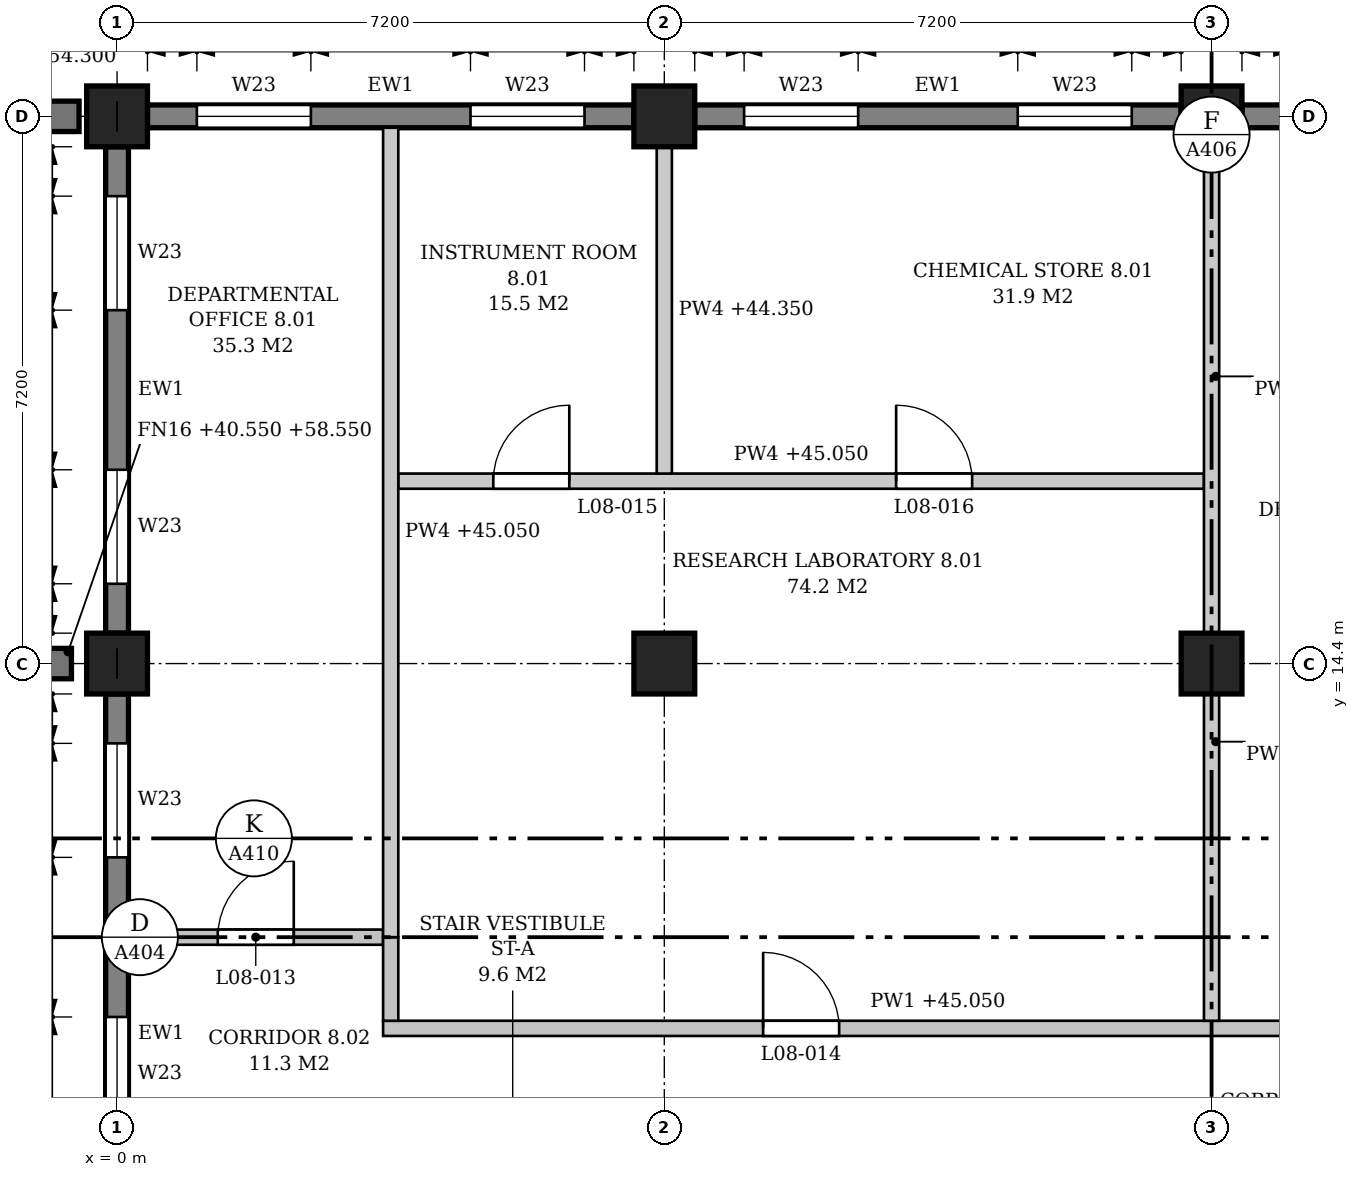
"""IFC4 building model, lengths in metres.
Left out: names, types, materials, properties, quantities, classifications, styles, units other than length and angle.
Written with IfcOpenShell. Run it as: python <this file> out.ifc"""

import sys

from ifc_helpers import new_model, si_unit, direction, frame, frame_2d, origin, origin_2d, place, context, subcontext, project, spatial, polyline, rectangle, outline, extrude, element, fill, save


model = new_model("IFC4")
c1 = context("Model", 3, precision=1e-05, world=origin(), true_north=direction((0.0, 1.0)))
c2 = subcontext(c1, "Body", "Model", "MODEL_VIEW")
j1 = project(units=[si_unit("LENGTHUNIT", "METRE"), si_unit("PLANEANGLEUNIT", "RADIAN")], contexts=[c1])
p1 = place(None, origin())
s1 = spatial("IfcSite", under=j1, at=p1, CompositionType="ELEMENT")
p2 = place(p1, origin())
s2 = spatial("IfcBuilding", under=s1, at=p2, CompositionType="ELEMENT")
p3 = place(p2, frame((0.0, 0.0, 40.8)))
s3 = spatial("IfcBuildingStorey", under=s2, at=p3, CompositionType="ELEMENT", Elevation=40.8)
for number, where, z_axis, x_axis in (
    (1, (0.0, 14.4, 0.0), (0.0, 0.0, 1.0), (1.0, 0.0, 0.0)),
    (2, (0.0, 21.6, 0.0), (0.0, 0.0, 1.0), (1.0, 0.0, 0.0)),
    (3, (7.2, 14.4, 0.0), (0.0, 0.0, 1.0), (1.0, 0.0, 0.0)),
    (4, (7.2, 21.6, 0.0), (0.0, 0.0, 1.0), (1.0, 0.0, 0.0)),
    (5, (14.4, 14.4, 0.0), (0.0, 0.0, 1.0), (1.0, 0.0, 0.0)),
    (6, (14.4, 21.6, 0.0), (0.0, 0.0, 1.0), (1.0, 0.0, 0.0)),
):
    element("IfcColumn", number, at=place(p3, frame(where, z_axis=z_axis, x_axis=x_axis)), inside=s3, PredefinedType="COLUMN", context=c2, shape_type="SweptSolid", body=[
        extrude(rectangle(XDim=0.8, YDim=0.8, at=origin_2d()), origin(), (0.0, 0.0, 1.0), 4.5),
    ])
p4 = place(p3, frame((0.0, 7.6, 0.0), z_axis=(0.0, 0.0, 1.0), x_axis=(0.0, 1.0, 0.0)))
e7 = element("IfcWall", 7, at=p4, inside=s3, PredefinedType="STANDARD", context=c2, shape_type="SweptSolid", body=[
    extrude(rectangle(XDim=6.4, YDim=0.3, at=frame_2d((3.2, 0.0))), origin(), (0.0, 0.0, 1.0), 3.65),
])
p5 = place(p4, frame((0.65, 0.0, 0.9)))
e8 = element("IfcOpeningElement", 8, at=p5, cuts=e7, PredefinedType="OPENING", context=c2, shape_type="SweptSolid", body=[
    extrude(outline(polyline([(0.0, 0.0), (1.5, 0.0), (1.5, 1.95), (0.75, 2.7), (0.0, 1.95), (0.0, 0.0)])), frame((0.0, 0.16, 0.0), z_axis=(0.0, -1.0, 0.0), x_axis=(1.0, 0.0, 0.0)), (0.0, 0.0, 1.0), 0.32),
])
p6 = place(p4, frame((4.25, 0.0, 0.9)))
e9 = element("IfcOpeningElement", 9, at=p6, cuts=e7, PredefinedType="OPENING", context=c2, shape_type="SweptSolid", body=[
    extrude(outline(polyline([(0.0, 0.0), (1.5, 0.0), (1.5, 1.95), (0.75, 2.7), (0.0, 1.95), (0.0, 0.0)])), frame((0.0, 0.16, 0.0), z_axis=(0.0, -1.0, 0.0), x_axis=(1.0, 0.0, 0.0)), (0.0, 0.0, 1.0), 0.32),
])
p7 = place(p3, frame((0.0, 14.8, 0.0), z_axis=(0.0, 0.0, 1.0), x_axis=(0.0, 1.0, 0.0)))
e10 = element("IfcWall", 10, at=p7, inside=s3, PredefinedType="STANDARD", context=c2, shape_type="SweptSolid", body=[
    extrude(rectangle(XDim=6.4, YDim=0.3, at=frame_2d((3.2, 0.0))), origin(), (0.0, 0.0, 1.0), 3.65),
])
p8 = place(p7, frame((0.65, 0.0, 0.9)))
e11 = element("IfcOpeningElement", 11, at=p8, cuts=e10, PredefinedType="OPENING", context=c2, shape_type="SweptSolid", body=[
    extrude(outline(polyline([(0.0, 0.0), (1.5, 0.0), (1.5, 1.95), (0.75, 2.7), (0.0, 1.95), (0.0, 0.0)])), frame((0.0, 0.16, 0.0), z_axis=(0.0, -1.0, 0.0), x_axis=(1.0, 0.0, 0.0)), (0.0, 0.0, 1.0), 0.32),
])
p9 = place(p7, frame((4.25, 0.0, 0.9)))
e12 = element("IfcOpeningElement", 12, at=p9, cuts=e10, PredefinedType="OPENING", context=c2, shape_type="SweptSolid", body=[
    extrude(outline(polyline([(0.0, 0.0), (1.5, 0.0), (1.5, 1.95), (0.75, 2.7), (0.0, 1.95), (0.0, 0.0)])), frame((0.0, 0.16, 0.0), z_axis=(0.0, -1.0, 0.0), x_axis=(1.0, 0.0, 0.0)), (0.0, 0.0, 1.0), 0.32),
])
p10 = place(p3, frame((21.2, 21.6, 0.0), z_axis=(0.0, 0.0, 1.0), x_axis=(-1.0, 0.0, 0.0)))
e13 = element("IfcWall", 13, at=p10, inside=s3, PredefinedType="STANDARD", context=c2, shape_type="SweptSolid", body=[
    extrude(rectangle(XDim=6.4, YDim=0.3, at=frame_2d((3.2, 0.0))), origin(), (0.0, 0.0, 1.0), 3.65),
])
p11 = place(p10, frame((0.65, 0.0, 0.9)))
e14 = element("IfcOpeningElement", 14, at=p11, cuts=e13, PredefinedType="OPENING", context=c2, shape_type="SweptSolid", body=[
    extrude(outline(polyline([(0.0, 0.0), (1.5, 0.0), (1.5, 1.95), (0.75, 2.7), (0.0, 1.95), (0.0, 0.0)])), frame((0.0, 0.16, 0.0), z_axis=(0.0, -1.0, 0.0), x_axis=(1.0, 0.0, 0.0)), (0.0, 0.0, 1.0), 0.32),
])
p12 = place(p10, frame((4.25, 0.0, 0.9)))
e15 = element("IfcOpeningElement", 15, at=p12, cuts=e13, PredefinedType="OPENING", context=c2, shape_type="SweptSolid", body=[
    extrude(outline(polyline([(0.0, 0.0), (1.5, 0.0), (1.5, 1.95), (0.75, 2.7), (0.0, 1.95), (0.0, 0.0)])), frame((0.0, 0.16, 0.0), z_axis=(0.0, -1.0, 0.0), x_axis=(1.0, 0.0, 0.0)), (0.0, 0.0, 1.0), 0.32),
])
p13 = place(p3, frame((14.0, 21.6, 0.0), z_axis=(0.0, 0.0, 1.0), x_axis=(-1.0, 0.0, 0.0)))
e16 = element("IfcWall", 16, at=p13, inside=s3, PredefinedType="STANDARD", context=c2, shape_type="SweptSolid", body=[
    extrude(rectangle(XDim=6.4, YDim=0.3, at=frame_2d((3.2, 0.0))), origin(), (0.0, 0.0, 1.0), 3.65),
])
p14 = place(p13, frame((0.65, 0.0, 0.9)))
e17 = element("IfcOpeningElement", 17, at=p14, cuts=e16, PredefinedType="OPENING", context=c2, shape_type="SweptSolid", body=[
    extrude(outline(polyline([(0.0, 0.0), (1.5, 0.0), (1.5, 1.95), (0.75, 2.7), (0.0, 1.95), (0.0, 0.0)])), frame((0.0, 0.16, 0.0), z_axis=(0.0, -1.0, 0.0), x_axis=(1.0, 0.0, 0.0)), (0.0, 0.0, 1.0), 0.32),
])
p15 = place(p13, frame((4.25, 0.0, 0.9)))
e18 = element("IfcOpeningElement", 18, at=p15, cuts=e16, PredefinedType="OPENING", context=c2, shape_type="SweptSolid", body=[
    extrude(outline(polyline([(0.0, 0.0), (1.5, 0.0), (1.5, 1.95), (0.75, 2.7), (0.0, 1.95), (0.0, 0.0)])), frame((0.0, 0.16, 0.0), z_axis=(0.0, -1.0, 0.0), x_axis=(1.0, 0.0, 0.0)), (0.0, 0.0, 1.0), 0.32),
])
p16 = place(p3, frame((6.8, 21.6, 0.0), z_axis=(0.0, 0.0, 1.0), x_axis=(-1.0, 0.0, 0.0)))
e19 = element("IfcWall", 19, at=p16, inside=s3, PredefinedType="STANDARD", context=c2, shape_type="SweptSolid", body=[
    extrude(rectangle(XDim=6.4, YDim=0.3, at=frame_2d((3.2, 0.0))), origin(), (0.0, 0.0, 1.0), 3.65),
])
p17 = place(p16, frame((0.65, 0.0, 0.9)))
e20 = element("IfcOpeningElement", 20, at=p17, cuts=e19, PredefinedType="OPENING", context=c2, shape_type="SweptSolid", body=[
    extrude(outline(polyline([(0.0, 0.0), (1.5, 0.0), (1.5, 1.95), (0.75, 2.7), (0.0, 1.95), (0.0, 0.0)])), frame((0.0, 0.16, 0.0), z_axis=(0.0, -1.0, 0.0), x_axis=(1.0, 0.0, 0.0)), (0.0, 0.0, 1.0), 0.32),
])
p18 = place(p16, frame((4.25, 0.0, 0.9)))
e21 = element("IfcOpeningElement", 21, at=p18, cuts=e19, PredefinedType="OPENING", context=c2, shape_type="SweptSolid", body=[
    extrude(outline(polyline([(0.0, 0.0), (1.5, 0.0), (1.5, 1.95), (0.75, 2.7), (0.0, 1.95), (0.0, 0.0)])), frame((0.0, 0.16, 0.0), z_axis=(0.0, -1.0, 0.0), x_axis=(1.0, 0.0, 0.0)), (0.0, 0.0, 1.0), 0.32),
])
p19 = place(p3, frame((-0.6, 14.4, -0.25), z_axis=(0.0, 0.0, 1.0), x_axis=(-1.0, 0.0, 0.0)))
e22 = element("IfcWall", 22, at=p19, inside=s3, PredefinedType="POLYGONAL", context=c2, shape_type="SweptSolid", body=[
    extrude(outline(polyline([(0.65, 0.0), (0.65, 17.775), (0.5, 18.0), (0.0, 18.0), (0.0, 0.0), (0.65, 0.0)])), frame((0.0, 0.2, 0.0), z_axis=(0.0, -1.0, 0.0), x_axis=(1.0, 0.0, 0.0)), (0.0, 0.0, 1.0), 0.4),
])
p20 = place(p3, frame((-0.5, 21.6, -0.25), z_axis=(0.0, 0.0, 1.0), x_axis=(-1.0, 0.0, 0.0)))
e23 = element("IfcWall", 23, at=p20, inside=s3, PredefinedType="POLYGONAL", context=c2, shape_type="SweptSolid", body=[
    extrude(outline(polyline([(0.55, 0.0), (0.55, 13.15), (0.15, 13.75), (0.0, 13.75), (0.0, 0.0), (0.55, 0.0)])), frame((0.0, 0.2, 0.0), z_axis=(0.0, -1.0, 0.0), x_axis=(1.0, 0.0, 0.0)), (0.0, 0.0, 1.0), 0.4),
])
p21 = place(p3, frame((3.5, 9.6, 0.0), z_axis=(0.0, 0.0, 1.0), x_axis=(1.0, 0.0, 0.0)))
e24 = element("IfcWall", 24, at=p21, inside=s3, PredefinedType="PARTITIONING", context=c2, shape_type="SweptSolid", body=[
    extrude(outline(polyline([(0.0, 0.0), (14.6, 0.0), (14.6, 4.25), (11.125, 4.25), (11.125, 3.55), (10.675, 3.55), (10.675, 4.25), (3.925, 4.25), (3.925, 3.55), (3.475, 3.55), (3.475, 4.25), (0.0, 4.25), (0.0, 0.0)])), frame((0.0, 0.1, 0.0), z_axis=(0.0, -1.0, 0.0), x_axis=(1.0, 0.0, 0.0)), (0.0, 0.0, 1.0), 0.2),
])
p22 = place(p21, frame((5.0, 0.0, 0.0)))
e25 = element("IfcOpeningElement", 25, at=p22, cuts=e24, PredefinedType="OPENING", context=c2, shape_type="SweptSolid", body=[
    extrude(rectangle(XDim=1.0, YDim=2.1, at=frame_2d((0.5, 1.05))), frame((0.0, 0.11, 0.0), z_axis=(0.0, -1.0, 0.0), x_axis=(1.0, 0.0, 0.0)), (0.0, 0.0, 1.0), 0.22),
])
p23 = place(p3, frame((0.15, 10.8, 0.0), z_axis=(0.0, 0.0, 1.0), x_axis=(1.0, 0.0, 0.0)))
e26 = element("IfcWall", 26, at=p23, inside=s3, PredefinedType="PARTITIONING", context=c2, shape_type="SweptSolid", body=[
    extrude(outline(polyline([(0.0, 0.0), (3.35, 0.0), (3.35, 4.25), (0.05, 4.25), (0.05, 3.65), (0.0, 3.65), (0.0, 0.0)])), frame((0.0, 0.1, 0.0), z_axis=(0.0, -1.0, 0.0), x_axis=(1.0, 0.0, 0.0)), (0.0, 0.0, 1.0), 0.2),
])
p24 = place(p23, frame((1.175, 0.0, 0.0)))
e27 = element("IfcOpeningElement", 27, at=p24, cuts=e26, PredefinedType="OPENING", context=c2, shape_type="SweptSolid", body=[
    extrude(rectangle(XDim=1.0, YDim=2.1, at=frame_2d((0.5, 1.05))), frame((0.0, 0.11, 0.0), z_axis=(0.0, -1.0, 0.0), x_axis=(1.0, 0.0, 0.0)), (0.0, 0.0, 1.0), 0.22),
])
p25 = place(p3, frame((3.7, 16.8, 0.0), z_axis=(0.0, 0.0, 1.0), x_axis=(1.0, 0.0, 0.0)))
e28 = element("IfcWall", 28, at=p25, inside=s3, PredefinedType="PARTITIONING", context=c2, shape_type="SweptSolid", body=[
    extrude(outline(polyline([(0.0, 0.0), (10.6, 0.0), (10.6, 3.55), (10.475, 3.55), (10.475, 4.25), (3.725, 4.25), (3.725, 3.55), (3.275, 3.55), (3.275, 4.25), (0.0, 4.25), (0.0, 0.0)])), frame((0.0, 0.1, 0.0), z_axis=(0.0, -1.0, 0.0), x_axis=(1.0, 0.0, 0.0)), (0.0, 0.0, 1.0), 0.2),
])
p26 = place(p25, frame((1.25, 0.0, 0.0)))
e29 = element("IfcOpeningElement", 29, at=p26, cuts=e28, PredefinedType="OPENING", context=c2, shape_type="SweptSolid", body=[
    extrude(rectangle(XDim=1.0, YDim=2.1, at=frame_2d((0.5, 1.05))), frame((0.0, 0.11, 0.0), z_axis=(0.0, -1.0, 0.0), x_axis=(1.0, 0.0, 0.0)), (0.0, 0.0, 1.0), 0.22),
])
p27 = place(p25, frame((6.55, 0.0, 0.0)))
e30 = element("IfcOpeningElement", 30, at=p27, cuts=e28, PredefinedType="OPENING", context=c2, shape_type="SweptSolid", body=[
    extrude(rectangle(XDim=1.0, YDim=2.1, at=frame_2d((0.5, 1.05))), frame((0.0, 0.11, 0.0), z_axis=(0.0, -1.0, 0.0), x_axis=(1.0, 0.0, 0.0)), (0.0, 0.0, 1.0), 0.22),
])
p28 = place(p3, frame((3.6, 9.7, 0.0), z_axis=(0.0, 0.0, 1.0), x_axis=(0.0, 1.0, 0.0)))
e31 = element("IfcWall", 31, at=p28, inside=s3, PredefinedType="PARTITIONING", context=c2, shape_type="SweptSolid", body=[
    extrude(rectangle(XDim=1.1, YDim=0.2, at=frame_2d((0.55, 0.0))), origin(), (0.0, 0.0, 1.0), 4.25),
])
p29 = place(p3, frame((3.6, 10.8, 0.0), z_axis=(0.0, 0.0, 1.0), x_axis=(0.0, 1.0, 0.0)))
e32 = element("IfcWall", 32, at=p29, inside=s3, PredefinedType="PARTITIONING", context=c2, shape_type="SweptSolid", body=[
    extrude(outline(polyline([(0.0, 0.0), (10.65, 0.0), (10.6, 4.25), (3.825, 4.25), (3.825, 3.55), (3.375, 3.55), (3.375, 4.25), (0.0, 4.25), (0.0, 0.0)])), frame((0.0, 0.1, 0.0), z_axis=(0.0, -1.0, 0.0), x_axis=(1.0, 0.0, 0.0)), (0.0, 0.0, 1.0), 0.2),
])
for number, where, z_axis, x_axis in (
    (33, (7.2, 16.9, 0.0), (0.0, 0.0, 1.0), (0.0, 1.0, 0.0)),
    (34, (14.4, 9.7, 0.0), (0.0, 0.0, 1.0), (0.0, 1.0, 0.0)),
):
    element("IfcWall", number, at=place(p3, frame(where, z_axis=z_axis, x_axis=x_axis)), inside=s3, PredefinedType="PARTITIONING", context=c2, shape_type="SweptSolid", body=[
        extrude(rectangle(XDim=4.3, YDim=0.2, at=frame_2d((2.15, 0.0))), origin(), (0.0, 0.0, 1.0), 3.55),
    ])
p30 = place(p3, frame((14.4, 14.8, 0.0), z_axis=(0.0, 0.0, 1.0), x_axis=(0.0, 1.0, 0.0)))
e35 = element("IfcWall", 35, at=p30, inside=s3, PredefinedType="PARTITIONING", context=c2, shape_type="SweptSolid", body=[
    extrude(rectangle(XDim=6.4, YDim=0.2, at=frame_2d((3.2, 0.0))), origin(), (0.0, 0.0, 1.0), 3.55),
])
p31 = place(p14, origin())
e36 = element("IfcWindow", 36, at=p31, inside=s3, PartitioningType="SINGLE_PANEL", PredefinedType="WINDOW", context=c2, shape_type="SweptSolid", body=[
    extrude(outline(polyline([(0.0, 0.0), (1.5, 0.0), (1.5, 1.95), (0.75, 2.7), (0.0, 1.95), (0.0, 0.0)])), frame((0.0, 0.03, 0.0), z_axis=(0.0, -1.0, 0.0), x_axis=(1.0, 0.0, 0.0)), (0.0, 0.0, 1.0), 0.06),
])
fill(e17, e36)
p32 = place(p15, origin())
e37 = element("IfcWindow", 37, at=p32, inside=s3, PartitioningType="SINGLE_PANEL", PredefinedType="WINDOW", context=c2, shape_type="SweptSolid", body=[
    extrude(outline(polyline([(0.0, 0.0), (1.5, 0.0), (1.5, 1.95), (0.75, 2.7), (0.0, 1.95), (0.0, 0.0)])), frame((0.0, 0.03, 0.0), z_axis=(0.0, -1.0, 0.0), x_axis=(1.0, 0.0, 0.0)), (0.0, 0.0, 1.0), 0.06),
])
fill(e18, e37)
p33 = place(p17, origin())
e38 = element("IfcWindow", 38, at=p33, inside=s3, PartitioningType="SINGLE_PANEL", PredefinedType="WINDOW", context=c2, shape_type="SweptSolid", body=[
    extrude(outline(polyline([(0.0, 0.0), (1.5, 0.0), (1.5, 1.95), (0.75, 2.7), (0.0, 1.95), (0.0, 0.0)])), frame((0.0, 0.03, 0.0), z_axis=(0.0, -1.0, 0.0), x_axis=(1.0, 0.0, 0.0)), (0.0, 0.0, 1.0), 0.06),
])
fill(e20, e38)
p34 = place(p18, origin())
e39 = element("IfcWindow", 39, at=p34, inside=s3, PartitioningType="SINGLE_PANEL", PredefinedType="WINDOW", context=c2, shape_type="SweptSolid", body=[
    extrude(outline(polyline([(0.0, 0.0), (1.5, 0.0), (1.5, 1.95), (0.75, 2.7), (0.0, 1.95), (0.0, 0.0)])), frame((0.0, 0.03, 0.0), z_axis=(0.0, -1.0, 0.0), x_axis=(1.0, 0.0, 0.0)), (0.0, 0.0, 1.0), 0.06),
])
fill(e21, e39)
p35 = place(p5, origin())
e40 = element("IfcWindow", 40, at=p35, inside=s3, PartitioningType="SINGLE_PANEL", PredefinedType="WINDOW", context=c2, shape_type="SweptSolid", body=[
    extrude(outline(polyline([(0.0, 0.0), (1.5, 0.0), (1.5, 1.95), (0.75, 2.7), (0.0, 1.95), (0.0, 0.0)])), frame((0.0, 0.03, 0.0), z_axis=(0.0, -1.0, 0.0), x_axis=(1.0, 0.0, 0.0)), (0.0, 0.0, 1.0), 0.06),
])
fill(e8, e40)
p36 = place(p6, origin())
e41 = element("IfcWindow", 41, at=p36, inside=s3, PartitioningType="SINGLE_PANEL", PredefinedType="WINDOW", context=c2, shape_type="SweptSolid", body=[
    extrude(outline(polyline([(0.0, 0.0), (1.5, 0.0), (1.5, 1.95), (0.75, 2.7), (0.0, 1.95), (0.0, 0.0)])), frame((0.0, 0.03, 0.0), z_axis=(0.0, -1.0, 0.0), x_axis=(1.0, 0.0, 0.0)), (0.0, 0.0, 1.0), 0.06),
])
fill(e9, e41)
p37 = place(p8, origin())
e42 = element("IfcWindow", 42, at=p37, inside=s3, PartitioningType="SINGLE_PANEL", PredefinedType="WINDOW", context=c2, shape_type="SweptSolid", body=[
    extrude(outline(polyline([(0.0, 0.0), (1.5, 0.0), (1.5, 1.95), (0.75, 2.7), (0.0, 1.95), (0.0, 0.0)])), frame((0.0, 0.03, 0.0), z_axis=(0.0, -1.0, 0.0), x_axis=(1.0, 0.0, 0.0)), (0.0, 0.0, 1.0), 0.06),
])
fill(e11, e42)
p38 = place(p9, origin())
e43 = element("IfcWindow", 43, at=p38, inside=s3, PartitioningType="SINGLE_PANEL", PredefinedType="WINDOW", context=c2, shape_type="SweptSolid", body=[
    extrude(outline(polyline([(0.0, 0.0), (1.5, 0.0), (1.5, 1.95), (0.75, 2.7), (0.0, 1.95), (0.0, 0.0)])), frame((0.0, 0.03, 0.0), z_axis=(0.0, -1.0, 0.0), x_axis=(1.0, 0.0, 0.0)), (0.0, 0.0, 1.0), 0.06),
])
fill(e12, e43)
p39 = place(p24, origin())
e44 = element("IfcDoor", 44, at=p39, inside=s3, OperationType="SINGLE_SWING_RIGHT", PredefinedType="DOOR", context=c2, shape_type="SweptSolid", body=[
    extrude(rectangle(XDim=1.0, YDim=2.1, at=frame_2d((0.5, 1.05))), frame((0.0, 0.025, 0.0), z_axis=(0.0, -1.0, 0.0), x_axis=(1.0, 0.0, 0.0)), (0.0, 0.0, 1.0), 0.05),
])
fill(e27, e44)
p40 = place(p22, origin())
e45 = element("IfcDoor", 45, at=p40, inside=s3, OperationType="SINGLE_SWING_LEFT", PredefinedType="DOOR", context=c2, shape_type="SweptSolid", body=[
    extrude(rectangle(XDim=1.0, YDim=2.1, at=frame_2d((0.5, 1.05))), frame((0.0, 0.025, 0.0), z_axis=(0.0, -1.0, 0.0), x_axis=(1.0, 0.0, 0.0)), (0.0, 0.0, 1.0), 0.05),
])
fill(e25, e45)
p41 = place(p26, origin())
e46 = element("IfcDoor", 46, at=p41, inside=s3, OperationType="SINGLE_SWING_RIGHT", PredefinedType="DOOR", context=c2, shape_type="SweptSolid", body=[
    extrude(rectangle(XDim=1.0, YDim=2.1, at=frame_2d((0.5, 1.05))), frame((0.0, 0.025, 0.0), z_axis=(0.0, -1.0, 0.0), x_axis=(1.0, 0.0, 0.0)), (0.0, 0.0, 1.0), 0.05),
])
fill(e29, e46)
p42 = place(p27, origin())
e47 = element("IfcDoor", 47, at=p42, inside=s3, OperationType="SINGLE_SWING_LEFT", PredefinedType="DOOR", context=c2, shape_type="SweptSolid", body=[
    extrude(rectangle(XDim=1.0, YDim=2.1, at=frame_2d((0.5, 1.05))), frame((0.0, 0.025, 0.0), z_axis=(0.0, -1.0, 0.0), x_axis=(1.0, 0.0, 0.0)), (0.0, 0.0, 1.0), 0.05),
])
fill(e30, e47)
save(model, sys.argv[1])
